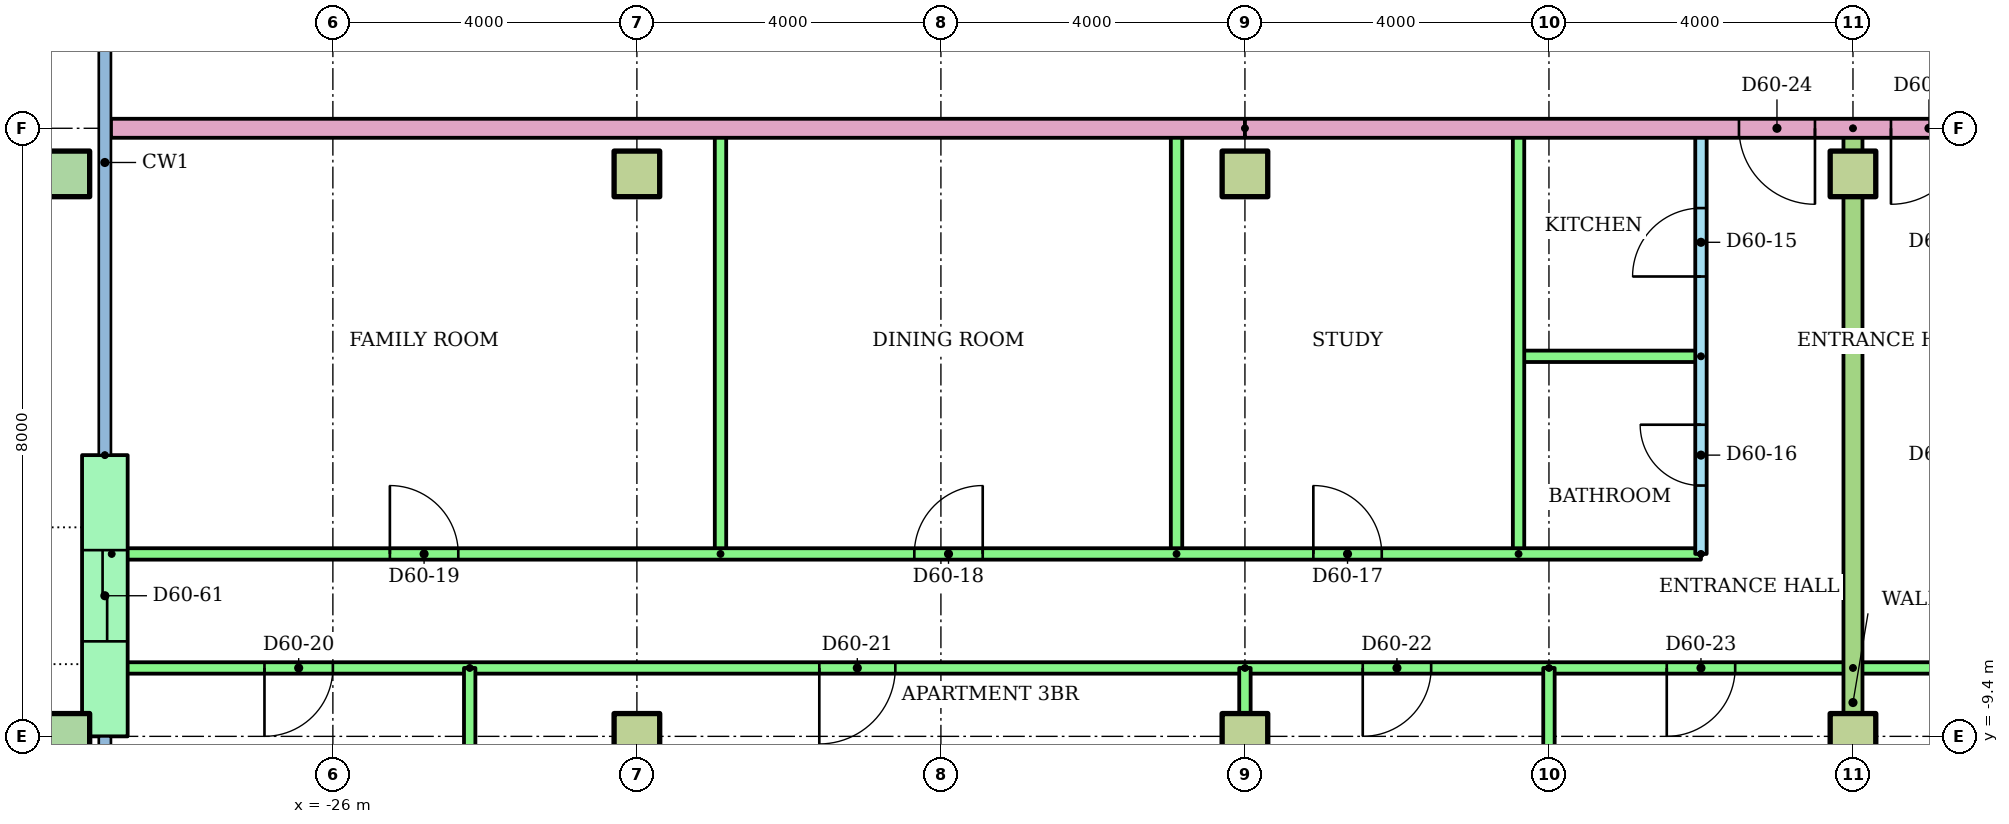
"""IFC4 building model, lengths in metres.
Left out: names, types, materials, properties, quantities, classifications, styles, units other than length and angle.
Written with IfcOpenShell. Run it as: python <this file> out.ifc"""

import sys

from ifc_helpers import new_model, si_unit, direction, frame, frame_2d, origin, origin_2d, place, context, subcontext, project, spatial, rectangle, hollow_rectangle, extrude, element, fill, save


model = new_model("IFC4")
c1 = context("Model", 3, precision=1e-05, world=origin(), true_north=direction((0.0, 1.0)))
c2 = subcontext(c1, "Body", "Model", "MODEL_VIEW")
j1 = project(units=[si_unit("LENGTHUNIT", "METRE"), si_unit("PLANEANGLEUNIT", "RADIAN")], contexts=[c1])
p1 = place(None, origin())
s1 = spatial("IfcSite", under=j1, at=p1, CompositionType="ELEMENT")
p2 = place(p1, origin())
s2 = spatial("IfcBuilding", under=s1, at=p2, CompositionType="ELEMENT")
p3 = place(p2, frame((0.0, 0.0, 230.0)))
s3 = spatial("IfcBuildingStorey", under=s2, at=p3, CompositionType="ELEMENT", Elevation=230.0)
p4 = place(p3, frame((-29.5, -9.4, 0.0)))
e1 = element("IfcColumn", 1, at=p4, inside=s3, PredefinedType="COLUMN", context=c2, shape_type="SweptSolid", body=[
    extrude(hollow_rectangle(XDim=0.6, YDim=0.6, WallThickness=0.03, at=origin_2d()), origin(), (0.0, 0.0, 1.0), 3.2),
])
for number, where in (
    (2, (-22.0, -9.4, 0.0)),
    (3, (-14.0, -9.4, 0.0)),
    (4, (-6.0, -9.4, 0.0)),
):
    element("IfcColumn", number, at=place(p3, frame(where)), inside=s3, PredefinedType="COLUMN", context=c2, shape_type="SweptSolid", body=[
        extrude(rectangle(XDim=0.6, YDim=0.6, at=origin_2d()), origin(), (0.0, 0.0, 1.0), 3.2),
    ])
p5 = place(p3, frame((-29.5, -2.0, 0.0)))
e5 = element("IfcColumn", 5, at=p5, inside=s3, PredefinedType="COLUMN", context=c2, shape_type="SweptSolid", body=[
    extrude(hollow_rectangle(XDim=0.6, YDim=0.6, WallThickness=0.03, at=origin_2d()), origin(), (0.0, 0.0, 1.0), 3.2),
])
for number, where in (
    (6, (-22.0, -2.0, 0.0)),
    (7, (-14.0, -2.0, 0.0)),
    (8, (-6.0, -2.0, 0.0)),
):
    element("IfcColumn", number, at=place(p3, frame(where)), inside=s3, PredefinedType="COLUMN", context=c2, shape_type="SweptSolid", body=[
        extrude(rectangle(XDim=0.6, YDim=0.6, at=origin_2d()), origin(), (0.0, 0.0, 1.0), 3.2),
    ])
p6 = place(p3, frame((-29.0, -5.7, 0.0), z_axis=(0.0, 0.0, 1.0), x_axis=(0.0, -1.0, 0.0)))
e9 = element("IfcWall", 9, at=p6, inside=s3, PredefinedType="STANDARD", context=c2, shape_type="SweptSolid", body=[
    extrude(rectangle(XDim=3.7, YDim=0.6, at=frame_2d((1.85, 0.0))), origin(), (0.0, 0.0, 1.0), 2.92),
])
p7 = place(p6, frame((1.25, 0.0, 0.0)))
e10 = element("IfcOpeningElement", 10, at=p7, cuts=e9, PredefinedType="OPENING", context=c2, shape_type="SweptSolid", body=[
    extrude(rectangle(XDim=1.2, YDim=2.1, at=frame_2d((0.6, 1.05))), frame((0.0, 0.31, 0.0), z_axis=(0.0, -1.0, 0.0), x_axis=(1.0, 0.0, 0.0)), (0.0, 0.0, 1.0), 0.62),
])
p8 = place(p3, frame((-8.0, -7.0, 0.0), z_axis=(0.0, 0.0, 1.0), x_axis=(0.0, 1.0, 0.0)))
e11 = element("IfcWall", 11, at=p8, inside=s3, PredefinedType="PARTITIONING", context=c2, shape_type="SweptSolid", body=[
    extrude(rectangle(XDim=5.6, YDim=0.15, at=frame_2d((2.8, 0.0))), origin(), (0.0, 0.0, 1.0), 2.4),
])
p9 = place(p8, frame((3.65, 0.0, 0.0)))
e12 = element("IfcOpeningElement", 12, at=p9, cuts=e11, PredefinedType="OPENING", context=c2, shape_type="SweptSolid", body=[
    extrude(rectangle(XDim=0.9, YDim=2.1, at=frame_2d((0.45, 1.05))), frame((0.0, 0.085, 0.0), z_axis=(0.0, -1.0, 0.0), x_axis=(1.0, 0.0, 0.0)), (0.0, 0.0, 1.0), 0.17),
])
p10 = place(p8, frame((0.9, 0.0, 0.0)))
e13 = element("IfcOpeningElement", 13, at=p10, cuts=e11, PredefinedType="OPENING", context=c2, shape_type="SweptSolid", body=[
    extrude(rectangle(XDim=0.8, YDim=2.1, at=frame_2d((0.4, 1.05))), frame((0.0, 0.085, 0.0), z_axis=(0.0, -1.0, 0.0), x_axis=(1.0, 0.0, 0.0)), (0.0, 0.0, 1.0), 0.17),
])
p11 = place(p3, frame((-8.0, -4.4, 0.0), z_axis=(0.0, 0.0, 1.0), x_axis=(-1.0, 0.0, 0.0)))
e14 = element("IfcWall", 14, at=p11, inside=s3, PredefinedType="PARTITIONING", context=c2, shape_type="SweptSolid", body=[
    extrude(rectangle(XDim=2.4, YDim=0.15, at=frame_2d((1.2, 0.0))), origin(), (0.0, 0.0, 1.0), 2.4),
])
for number, where, z_axis, x_axis in (
    (15, (-10.4, -7.0, 0.0), (0.0, 0.0, 1.0), (0.0, 1.0, 0.0)),
    (16, (-14.9, -7.0, 0.0), (0.0, 0.0, 1.0), (0.0, 1.0, 0.0)),
    (17, (-20.9, -7.0, 0.0), (0.0, 0.0, 1.0), (0.0, 1.0, 0.0)),
):
    element("IfcWall", number, at=place(p3, frame(where, z_axis=z_axis, x_axis=x_axis)), inside=s3, PredefinedType="PARTITIONING", context=c2, shape_type="SweptSolid", body=[
        extrude(rectangle(XDim=5.6, YDim=0.15, at=frame_2d((2.8, 0.0))), origin(), (0.0, 0.0, 1.0), 2.4),
    ])
p12 = place(p3, frame((-28.91, -7.0, 0.0)))
e18 = element("IfcWall", 18, at=p12, inside=s3, PredefinedType="PARTITIONING", context=c2, shape_type="SweptSolid", body=[
    extrude(rectangle(XDim=20.91, YDim=0.15, at=frame_2d((10.455, 0.0))), origin(), (0.0, 0.0, 1.0), 2.4),
])
p13 = place(p12, frame((15.81, 0.0, 0.0)))
e19 = element("IfcOpeningElement", 19, at=p13, cuts=e18, PredefinedType="OPENING", context=c2, shape_type="SweptSolid", body=[
    extrude(rectangle(XDim=0.9, YDim=2.1, at=frame_2d((0.45, 1.05))), frame((0.0, 0.085, 0.0), z_axis=(0.0, -1.0, 0.0), x_axis=(1.0, 0.0, 0.0)), (0.0, 0.0, 1.0), 0.17),
])
p14 = place(p12, frame((10.56, 0.0, 0.0)))
e20 = element("IfcOpeningElement", 20, at=p14, cuts=e18, PredefinedType="OPENING", context=c2, shape_type="SweptSolid", body=[
    extrude(rectangle(XDim=0.9, YDim=2.1, at=frame_2d((0.45, 1.05))), frame((0.0, 0.085, 0.0), z_axis=(0.0, -1.0, 0.0), x_axis=(1.0, 0.0, 0.0)), (0.0, 0.0, 1.0), 0.17),
])
p15 = place(p12, frame((3.66, 0.0, 0.0)))
e21 = element("IfcOpeningElement", 21, at=p15, cuts=e18, PredefinedType="OPENING", context=c2, shape_type="SweptSolid", body=[
    extrude(rectangle(XDim=0.9, YDim=2.1, at=frame_2d((0.45, 1.05))), frame((0.0, 0.085, 0.0), z_axis=(0.0, -1.0, 0.0), x_axis=(1.0, 0.0, 0.0)), (0.0, 0.0, 1.0), 0.17),
])
p16 = place(p3, frame((-6.0, -8.5, 0.0), z_axis=(0.0, 0.0, 1.0), x_axis=(-1.0, 0.0, 0.0)))
e22 = element("IfcWall", 22, at=p16, inside=s3, PredefinedType="PARTITIONING", context=c2, shape_type="SweptSolid", body=[
    extrude(rectangle(XDim=22.91, YDim=0.15, at=frame_2d((11.455, 0.0))), origin(), (0.0, 0.0, 1.0), 2.4),
])
p17 = place(p16, frame((20.0, 0.0, 0.0)))
e23 = element("IfcOpeningElement", 23, at=p17, cuts=e22, PredefinedType="OPENING", context=c2, shape_type="SweptSolid", body=[
    extrude(rectangle(XDim=0.9, YDim=2.1, at=frame_2d((0.45, 1.05))), frame((0.0, 0.085, 0.0), z_axis=(0.0, -1.0, 0.0), x_axis=(1.0, 0.0, 0.0)), (0.0, 0.0, 1.0), 0.17),
])
p18 = place(p16, frame((12.6, 0.0, 0.0)))
e24 = element("IfcOpeningElement", 24, at=p18, cuts=e22, PredefinedType="OPENING", context=c2, shape_type="SweptSolid", body=[
    extrude(rectangle(XDim=1.0, YDim=2.1, at=frame_2d((0.5, 1.05))), frame((0.0, 0.085, 0.0), z_axis=(0.0, -1.0, 0.0), x_axis=(1.0, 0.0, 0.0)), (0.0, 0.0, 1.0), 0.17),
])
p19 = place(p16, frame((5.55, 0.0, 0.0)))
e25 = element("IfcOpeningElement", 25, at=p19, cuts=e22, PredefinedType="OPENING", context=c2, shape_type="SweptSolid", body=[
    extrude(rectangle(XDim=0.9, YDim=2.1, at=frame_2d((0.45, 1.05))), frame((0.0, 0.085, 0.0), z_axis=(0.0, -1.0, 0.0), x_axis=(1.0, 0.0, 0.0)), (0.0, 0.0, 1.0), 0.17),
])
p20 = place(p16, frame((1.55, 0.0, 0.0)))
e26 = element("IfcOpeningElement", 26, at=p20, cuts=e22, PredefinedType="OPENING", context=c2, shape_type="SweptSolid", body=[
    extrude(rectangle(XDim=0.9, YDim=2.1, at=frame_2d((0.45, 1.05))), frame((0.0, 0.085, 0.0), z_axis=(0.0, -1.0, 0.0), x_axis=(1.0, 0.0, 0.0)), (0.0, 0.0, 1.0), 0.17),
])
p21 = place(p3, frame((-24.2, -8.5, 0.0), z_axis=(0.0, 0.0, 1.0), x_axis=(0.0, -1.0, 0.0)))
e27 = element("IfcWall", 27, at=p21, inside=s3, PredefinedType="PARTITIONING", context=c2, shape_type="SweptSolid", body=[
    extrude(rectangle(XDim=6.22, YDim=0.15, at=frame_2d((3.11, 0.0))), origin(), (0.0, 0.0, 1.0), 2.4),
])
p22 = place(p3, frame((-14.0, -8.5, 0.0), z_axis=(0.0, 0.0, 1.0), x_axis=(0.0, -1.0, 0.0)))
e28 = element("IfcWall", 28, at=p22, inside=s3, PredefinedType="PARTITIONING", context=c2, shape_type="SweptSolid", body=[
    extrude(rectangle(XDim=8.01, YDim=0.15, at=frame_2d((4.005, 0.0))), origin(), (0.0, 0.0, 1.0), 2.4),
])
p23 = place(p3, frame((-10.0, -8.5, 0.0), z_axis=(0.0, 0.0, 1.0), x_axis=(0.0, -1.0, 0.0)))
e29 = element("IfcWall", 29, at=p23, inside=s3, PredefinedType="PARTITIONING", context=c2, shape_type="SweptSolid", body=[
    extrude(rectangle(XDim=8.021, YDim=0.15, at=frame_2d((4.01, 0.0))), origin(), (0.0, 0.0, 1.0), 2.4),
])
p24 = place(p3, frame((10.0, -8.5, 0.0), z_axis=(0.0, 0.0, 1.0), x_axis=(-1.0, 0.0, 0.0)))
e30 = element("IfcWall", 30, at=p24, inside=s3, PredefinedType="PARTITIONING", context=c2, shape_type="SweptSolid", body=[
    extrude(rectangle(XDim=16.0, YDim=0.15, at=frame_2d((8.0, 0.0))), origin(), (0.0, 0.0, 1.0), 2.4),
])
p25 = place(p24, frame((13.55, 0.0, 0.0)))
e31 = element("IfcOpeningElement", 31, at=p25, cuts=e30, PredefinedType="OPENING", context=c2, shape_type="SweptSolid", body=[
    extrude(rectangle(XDim=0.9, YDim=2.1, at=frame_2d((0.45, 1.05))), frame((0.0, 0.085, 0.0), z_axis=(0.0, -1.0, 0.0), x_axis=(1.0, 0.0, 0.0)), (0.0, 0.0, 1.0), 0.17),
])
p26 = place(p24, frame((9.5, 0.0, 0.0)))
e32 = element("IfcOpeningElement", 32, at=p26, cuts=e30, PredefinedType="OPENING", context=c2, shape_type="SweptSolid", body=[
    extrude(rectangle(XDim=1.0, YDim=2.1, at=frame_2d((0.5, 1.05))), frame((0.0, 0.085, 0.0), z_axis=(0.0, -1.0, 0.0), x_axis=(1.0, 0.0, 0.0)), (0.0, 0.0, 1.0), 0.17),
])
p27 = place(p24, frame((5.55, 0.0, 0.0)))
e33 = element("IfcOpeningElement", 33, at=p27, cuts=e30, PredefinedType="OPENING", context=c2, shape_type="SweptSolid", body=[
    extrude(rectangle(XDim=0.9, YDim=2.1, at=frame_2d((0.45, 1.05))), frame((0.0, 0.085, 0.0), z_axis=(0.0, -1.0, 0.0), x_axis=(1.0, 0.0, 0.0)), (0.0, 0.0, 1.0), 0.17),
])
p28 = place(p24, frame((1.55, 0.0, 0.0)))
e34 = element("IfcOpeningElement", 34, at=p28, cuts=e30, PredefinedType="OPENING", context=c2, shape_type="SweptSolid", body=[
    extrude(rectangle(XDim=0.9, YDim=2.1, at=frame_2d((0.45, 1.05))), frame((0.0, 0.085, 0.0), z_axis=(0.0, -1.0, 0.0), x_axis=(1.0, 0.0, 0.0)), (0.0, 0.0, 1.0), 0.17),
])
p29 = place(p3, frame((-6.0, -1.4, 0.0), z_axis=(0.0, 0.0, 1.0), x_axis=(0.0, -1.0, 0.0)))
e35 = element("IfcWall", 35, at=p29, inside=s3, PredefinedType="PARTITIONING", context=c2, shape_type="SweptSolid", body=[
    extrude(rectangle(XDim=15.11, YDim=0.25, at=frame_2d((7.555, 0.0))), origin(), (0.0, 0.0, 1.0), 2.4),
])
p30 = place(p3, frame((-14.0, -1.4, 0.0), z_axis=(0.0, 0.0, 1.0), x_axis=(-1.0, 0.0, 0.0)))
e36 = element("IfcWall", 36, at=p30, inside=s3, PredefinedType="PARTITIONING", context=c2, shape_type="SweptSolid", body=[
    extrude(rectangle(XDim=14.92, YDim=0.25, at=frame_2d((7.46, 0.0))), origin(), (0.0, 0.0, 1.0), 2.4),
])
p31 = place(p3, frame((14.0, -1.4, 0.0), z_axis=(0.0, 0.0, 1.0), x_axis=(-1.0, 0.0, 0.0)))
e37 = element("IfcWall", 37, at=p31, inside=s3, PredefinedType="PARTITIONING", context=c2, shape_type="SweptSolid", body=[
    extrude(rectangle(XDim=28.0, YDim=0.25, at=frame_2d((14.0, 0.0))), origin(), (0.0, 0.0, 1.0), 2.4),
])
p32 = place(p31, frame((20.5, 0.0, 0.0)))
e38 = element("IfcOpeningElement", 38, at=p32, cuts=e37, PredefinedType="OPENING", context=c2, shape_type="SweptSolid", body=[
    extrude(rectangle(XDim=1.0, YDim=2.1, at=frame_2d((0.5, 1.05))), frame((0.0, 0.135, 0.0), z_axis=(0.0, -1.0, 0.0), x_axis=(1.0, 0.0, 0.0)), (0.0, 0.0, 1.0), 0.27),
])
p33 = place(p31, frame((18.5, 0.0, 0.0)))
e39 = element("IfcOpeningElement", 39, at=p33, cuts=e37, PredefinedType="OPENING", context=c2, shape_type="SweptSolid", body=[
    extrude(rectangle(XDim=1.0, YDim=2.1, at=frame_2d((0.5, 1.05))), frame((0.0, 0.135, 0.0), z_axis=(0.0, -1.0, 0.0), x_axis=(1.0, 0.0, 0.0)), (0.0, 0.0, 1.0), 0.27),
])
p34 = place(p31, frame((2.5, 0.0, 0.0)))
e40 = element("IfcOpeningElement", 40, at=p34, cuts=e37, PredefinedType="OPENING", context=c2, shape_type="SweptSolid", body=[
    extrude(rectangle(XDim=1.0, YDim=2.1, at=frame_2d((0.5, 1.05))), frame((0.0, 0.135, 0.0), z_axis=(0.0, -1.0, 0.0), x_axis=(1.0, 0.0, 0.0)), (0.0, 0.0, 1.0), 0.27),
])
p35 = place(p9, origin())
e41 = element("IfcDoor", 41, at=p35, inside=s3, OperationType="SINGLE_SWING_LEFT", PredefinedType="DOOR", context=c2, shape_type="SweptSolid", body=[
    extrude(rectangle(XDim=0.9, YDim=2.1, at=frame_2d((0.45, 1.05))), frame((0.0, 0.025, 0.0), z_axis=(0.0, -1.0, 0.0), x_axis=(1.0, 0.0, 0.0)), (0.0, 0.0, 1.0), 0.05),
])
fill(e12, e41)
p36 = place(p10, origin())
e42 = element("IfcDoor", 42, at=p36, inside=s3, OperationType="SINGLE_SWING_RIGHT", PredefinedType="DOOR", context=c2, shape_type="SweptSolid", body=[
    extrude(rectangle(XDim=0.8, YDim=2.1, at=frame_2d((0.4, 1.05))), frame((0.0, 0.025, 0.0), z_axis=(0.0, -1.0, 0.0), x_axis=(1.0, 0.0, 0.0)), (0.0, 0.0, 1.0), 0.05),
])
fill(e13, e42)
p37 = place(p13, origin())
e43 = element("IfcDoor", 43, at=p37, inside=s3, OperationType="SINGLE_SWING_LEFT", PredefinedType="DOOR", context=c2, shape_type="SweptSolid", body=[
    extrude(rectangle(XDim=0.9, YDim=2.1, at=frame_2d((0.45, 1.05))), frame((0.0, 0.025, 0.0), z_axis=(0.0, -1.0, 0.0), x_axis=(1.0, 0.0, 0.0)), (0.0, 0.0, 1.0), 0.05),
])
fill(e19, e43)
p38 = place(p14, origin())
e44 = element("IfcDoor", 44, at=p38, inside=s3, OperationType="SINGLE_SWING_RIGHT", PredefinedType="DOOR", context=c2, shape_type="SweptSolid", body=[
    extrude(rectangle(XDim=0.9, YDim=2.1, at=frame_2d((0.45, 1.05))), frame((0.0, 0.025, 0.0), z_axis=(0.0, -1.0, 0.0), x_axis=(1.0, 0.0, 0.0)), (0.0, 0.0, 1.0), 0.05),
])
fill(e20, e44)
p39 = place(p15, origin())
e45 = element("IfcDoor", 45, at=p39, inside=s3, OperationType="SINGLE_SWING_LEFT", PredefinedType="DOOR", context=c2, shape_type="SweptSolid", body=[
    extrude(rectangle(XDim=0.9, YDim=2.1, at=frame_2d((0.45, 1.05))), frame((0.0, 0.025, 0.0), z_axis=(0.0, -1.0, 0.0), x_axis=(1.0, 0.0, 0.0)), (0.0, 0.0, 1.0), 0.05),
])
fill(e21, e45)
p40 = place(p17, origin())
e46 = element("IfcDoor", 46, at=p40, inside=s3, OperationType="SINGLE_SWING_RIGHT", PredefinedType="DOOR", context=c2, shape_type="SweptSolid", body=[
    extrude(rectangle(XDim=0.9, YDim=2.1, at=frame_2d((0.45, 1.05))), frame((0.0, 0.025, 0.0), z_axis=(0.0, -1.0, 0.0), x_axis=(1.0, 0.0, 0.0)), (0.0, 0.0, 1.0), 0.05),
])
fill(e23, e46)
p41 = place(p18, origin())
e47 = element("IfcDoor", 47, at=p41, inside=s3, OperationType="SINGLE_SWING_RIGHT", PredefinedType="DOOR", context=c2, shape_type="SweptSolid", body=[
    extrude(rectangle(XDim=1.0, YDim=2.1, at=frame_2d((0.5, 1.05))), frame((0.0, 0.025, 0.0), z_axis=(0.0, -1.0, 0.0), x_axis=(1.0, 0.0, 0.0)), (0.0, 0.0, 1.0), 0.05),
])
fill(e24, e47)
p42 = place(p19, origin())
e48 = element("IfcDoor", 48, at=p42, inside=s3, OperationType="SINGLE_SWING_RIGHT", PredefinedType="DOOR", context=c2, shape_type="SweptSolid", body=[
    extrude(rectangle(XDim=0.9, YDim=2.1, at=frame_2d((0.45, 1.05))), frame((0.0, 0.025, 0.0), z_axis=(0.0, -1.0, 0.0), x_axis=(1.0, 0.0, 0.0)), (0.0, 0.0, 1.0), 0.05),
])
fill(e25, e48)
p43 = place(p20, origin())
e49 = element("IfcDoor", 49, at=p43, inside=s3, OperationType="SINGLE_SWING_RIGHT", PredefinedType="DOOR", context=c2, shape_type="SweptSolid", body=[
    extrude(rectangle(XDim=0.9, YDim=2.1, at=frame_2d((0.45, 1.05))), frame((0.0, 0.025, 0.0), z_axis=(0.0, -1.0, 0.0), x_axis=(1.0, 0.0, 0.0)), (0.0, 0.0, 1.0), 0.05),
])
fill(e26, e49)
p44 = place(p32, origin())
e50 = element("IfcDoor", 50, at=p44, inside=s3, OperationType="SINGLE_SWING_LEFT", PredefinedType="DOOR", context=c2, shape_type="SweptSolid", body=[
    extrude(rectangle(XDim=1.0, YDim=2.1, at=frame_2d((0.5, 1.05))), frame((0.0, 0.025, 0.0), z_axis=(0.0, -1.0, 0.0), x_axis=(1.0, 0.0, 0.0)), (0.0, 0.0, 1.0), 0.05),
])
fill(e38, e50)
p45 = place(p33, origin())
e51 = element("IfcDoor", 51, at=p45, inside=s3, OperationType="SINGLE_SWING_RIGHT", PredefinedType="DOOR", context=c2, shape_type="SweptSolid", body=[
    extrude(rectangle(XDim=1.0, YDim=2.1, at=frame_2d((0.5, 1.05))), frame((0.0, 0.025, 0.0), z_axis=(0.0, -1.0, 0.0), x_axis=(1.0, 0.0, 0.0)), (0.0, 0.0, 1.0), 0.05),
])
fill(e39, e51)
p46 = place(p7, origin())
e52 = element("IfcDoor", 52, at=p46, inside=s3, OperationType="SLIDING_TO_LEFT", PredefinedType="DOOR", context=c2, shape_type="SweptSolid", body=[
    extrude(rectangle(XDim=1.2, YDim=2.1, at=frame_2d((0.6, 1.05))), frame((0.0, 0.025, 0.0), z_axis=(0.0, -1.0, 0.0), x_axis=(1.0, 0.0, 0.0)), (0.0, 0.0, 1.0), 0.05),
])
fill(e10, e52)
save(model, sys.argv[1])
